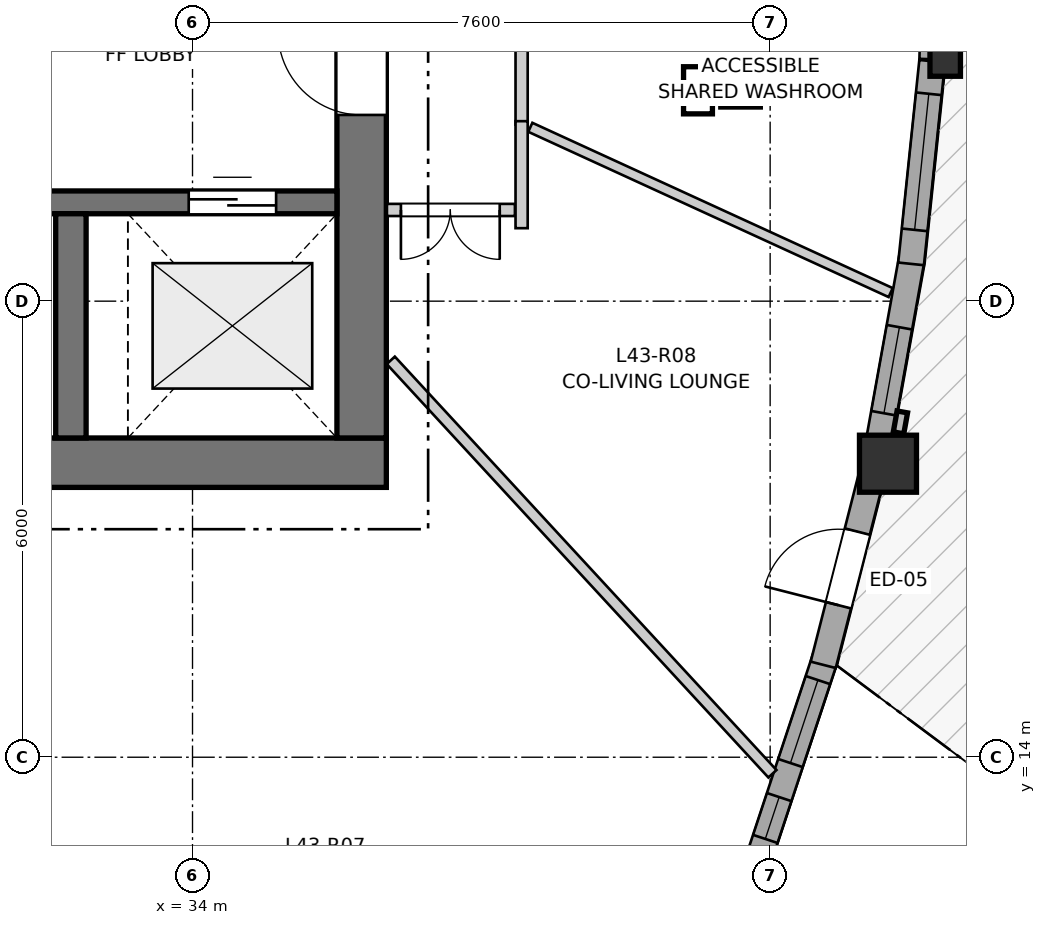
"""IFC4 building model, lengths in metres.
Left out: names, types, materials, properties, quantities, classifications, styles, units other than length and angle.
Written with IfcOpenShell. Run it as: python <this file> out.ifc"""

import sys

from ifc_helpers import new_model, si_unit, direction, frame, frame_2d, origin, origin_2d, place, context, subcontext, project, spatial, rectangle, i_section, extrude, source, transform, mapped, element, fill, save


model = new_model("IFC4")
c1 = context("Model", 3, precision=1e-05, world=origin(), true_north=direction((0.0, 1.0)))
c2 = subcontext(c1, "Body", "Model", "MODEL_VIEW")
j1 = project(units=[si_unit("LENGTHUNIT", "METRE"), si_unit("PLANEANGLEUNIT", "RADIAN")], contexts=[c1])
p1 = place(None, origin())
s1 = spatial("IfcSite", under=j1, at=p1, CompositionType="ELEMENT")
p2 = place(p1, origin())
s2 = spatial("IfcBuilding", under=s1, at=p2, CompositionType="ELEMENT")
p3 = place(p2, frame((0.0, 0.0, 145.8)))
s3 = spatial("IfcBuildingStorey", under=s2, at=p3, CompositionType="ELEMENT", Elevation=145.8)
p4 = place(p3, frame((24.15, 17.875, 0.0), z_axis=(0.0, 0.0, 1.0), x_axis=(1.0, 0.0, 0.0)))
e1 = element("IfcWall", 1, at=p4, inside=s3, PredefinedType="SHEAR", context=c2, shape_type="SweptSolid", body=[
    extrude(rectangle(XDim=12.4, YDim=0.65, at=frame_2d((6.2, 0.0))), origin(), (0.0, 0.0, 1.0), 2.95),
])
p5 = place(p3, frame((36.225, 18.2, 0.0), z_axis=(0.0, 0.0, 1.0), x_axis=(0.0, 1.0, 0.0)))
e2 = element("IfcWall", 2, at=p5, inside=s3, PredefinedType="SHEAR", context=c2, shape_type="SweptSolid", body=[
    extrude(rectangle(XDim=15.6, YDim=0.65, at=frame_2d((7.8, 0.0))), origin(), (0.0, 0.0, 1.0), 2.95),
])
p6 = place(p5, frame((4.25, 0.0, 0.0)))
e3 = element("IfcOpeningElement", 3, at=p6, cuts=e2, PredefinedType="OPENING", context=c2, shape_type="SweptSolid", body=[
    extrude(rectangle(XDim=1.1, YDim=2.15, at=frame_2d((0.55, 1.075))), frame((0.0, 0.335, 0.0), z_axis=(0.0, -1.0, 0.0), x_axis=(1.0, 0.0, 0.0)), (0.0, 0.0, 1.0), 0.67),
])
p7 = place(p5, frame((10.25, 0.0, 0.0)))
e4 = element("IfcOpeningElement", 4, at=p7, cuts=e2, PredefinedType="OPENING", context=c2, shape_type="SweptSolid", body=[
    extrude(rectangle(XDim=1.1, YDim=2.15, at=frame_2d((0.55, 1.075))), frame((0.0, 0.335, 0.0), z_axis=(0.0, -1.0, 0.0), x_axis=(1.0, 0.0, 0.0)), (0.0, 0.0, 1.0), 0.67),
])
p8 = place(p3, frame((24.8, 21.3, 0.0), z_axis=(0.0, 0.0, 1.0), x_axis=(1.0, 0.0, 0.0)))
e5 = element("IfcWall", 5, at=p8, inside=s3, PredefinedType="SHEAR", context=c2, shape_type="SweptSolid", body=[
    extrude(rectangle(XDim=11.1, YDim=0.3, at=frame_2d((5.55, 0.0))), origin(), (0.0, 0.0, 1.0), 2.95),
])
p9 = place(p8, frame((6.22, 0.0, 0.0)))
e6 = element("IfcOpeningElement", 6, at=p9, cuts=e5, PredefinedType="OPENING", context=c2, shape_type="SweptSolid", body=[
    extrude(rectangle(XDim=0.98, YDim=2.15, at=frame_2d((0.49, 1.075))), frame((0.0, 0.16, 0.0), z_axis=(0.0, -1.0, 0.0), x_axis=(1.0, 0.0, 0.0)), (0.0, 0.0, 1.0), 0.32),
])
p10 = place(p8, frame((9.15, 0.0, 0.0)))
e7 = element("IfcOpeningElement", 7, at=p10, cuts=e5, PredefinedType="OPENING", context=c2, shape_type="SweptSolid", body=[
    extrude(rectangle(XDim=1.15, YDim=2.15, at=frame_2d((0.575, 1.075))), frame((0.0, 0.16, 0.0), z_axis=(0.0, -1.0, 0.0), x_axis=(1.0, 0.0, 0.0)), (0.0, 0.0, 1.0), 0.32),
])
p11 = place(p3, frame((32.4, 18.2, 0.0), z_axis=(0.0, 0.0, 1.0), x_axis=(0.0, 1.0, 0.0)))
e8 = element("IfcWall", 8, at=p11, inside=s3, PredefinedType="SHEAR", context=c2, shape_type="SweptSolid", body=[
    extrude(rectangle(XDim=2.95, YDim=0.4, at=frame_2d((1.475, 0.0))), origin(), (0.0, 0.0, 1.0), 2.95),
])
m1 = source(origin(), c2, "Body", "SweptSolid", [
    extrude(rectangle(XDim=0.75, YDim=0.75, at=origin_2d()), origin(), (0.0, 0.0, 1.0), 2.95),
])
p12 = place(p3, frame((43.15, 17.862, 0.0), z_axis=(0.0, 0.0, 1.0), x_axis=(1.0, 0.0, 0.0)))
e9 = element("IfcColumn", 9, at=p12, inside=s3, PredefinedType="COLUMN", context=c2, shape_type="MappedRepresentation", body=[
    mapped(m1, transform((0.0, 0.0, 0.0), x_axis=(1.0, 0.0, 0.0), y_axis=(0.0, 1.0, 0.0), z_axis=(0.0, 0.0, 1.0), scale=1.0)),
])
m2 = source(origin(), c2, "Body", "SweptSolid", [
    extrude(i_section(OverallWidth=0.401, OverallDepth=0.399, WebThickness=0.023, FlangeThickness=0.036, FilletRadius=0.015, at=origin_2d()), origin(), (0.0, 0.0, 1.0), 2.95),
])
p13 = place(p3, frame((43.903, 23.158, 0.0), z_axis=(0.0, 0.0, 1.0), x_axis=(1.0, 0.0, 0.0)))
e10 = element("IfcColumn", 10, at=p13, inside=s3, PredefinedType="PILASTER", context=c2, shape_type="MappedRepresentation", body=[
    mapped(m2, transform((0.0, 0.0, 0.0), x_axis=(1.0, 0.0, 0.0), y_axis=(0.0, 1.0, 0.0), z_axis=(0.0, 0.0, 1.0), scale=1.0)),
])
p14 = place(p3, frame((41.438, 12.629, 0.0), z_axis=(0.0, 0.0, 1.0), x_axis=(0.314534815528, 0.949245937479, 0.0)))
e11 = element("IfcWall", 11, at=p14, inside=s3, PredefinedType="SOLIDWALL", context=c2, shape_type="SweptSolid", body=[
    extrude(rectangle(XDim=2.813, YDim=0.34, at=frame_2d((1.406, 0.0))), origin(), (0.0, 0.0, 1.0), 2.53),
])
p15 = place(p14, frame((0.312, 0.0, 0.82)))
e12 = element("IfcOpeningElement", 12, at=p15, cuts=e11, PredefinedType="OPENING", context=c2, shape_type="SweptSolid", body=[
    extrude(rectangle(XDim=0.58, YDim=1.35, at=frame_2d((0.29, 0.675))), frame((0.0, 0.18, 0.0), z_axis=(0.0, -1.0, 0.0), x_axis=(1.0, 0.0, 0.0)), (0.0, 0.0, 1.0), 0.36),
])
p16 = place(p14, frame((1.363, 0.0, 0.82)))
e13 = element("IfcOpeningElement", 13, at=p16, cuts=e11, PredefinedType="OPENING", context=c2, shape_type="SweptSolid", body=[
    extrude(rectangle(XDim=1.15, YDim=1.2, at=frame_2d((0.575, 0.6))), frame((0.0, 0.18, 0.0), z_axis=(0.0, -1.0, 0.0), x_axis=(1.0, 0.0, 0.0)), (0.0, 0.0, 1.0), 0.36),
])
p17 = place(p3, frame((42.298, 15.215, 0.0), z_axis=(0.0, 0.0, 1.0), x_axis=(0.24779460158, 0.968812590457, 0.0)))
e14 = element("IfcWall", 14, at=p17, inside=s3, PredefinedType="SOLIDWALL", context=c2, shape_type="SweptSolid", body=[
    extrude(rectangle(XDim=2.62, YDim=0.34, at=frame_2d((1.31, 0.0))), origin(), (0.0, 0.0, 1.0), 2.53),
])
p18 = place(p17, frame((0.81, 0.0, 0.0)))
e15 = element("IfcOpeningElement", 15, at=p18, cuts=e14, PredefinedType="OPENING", context=c2, shape_type="SweptSolid", body=[
    extrude(rectangle(XDim=1.0, YDim=2.1, at=frame_2d((0.5, 1.05))), frame((0.0, 0.18, 0.0), z_axis=(0.0, -1.0, 0.0), x_axis=(1.0, 0.0, 0.0)), (0.0, 0.0, 1.0), 0.36),
])
p19 = place(p3, frame((43.01, 18.044, 0.0), z_axis=(0.0, 0.0, 1.0), x_axis=(0.177116262048, 0.984189935794, 0.0)))
e16 = element("IfcWall", 16, at=p19, inside=s3, PredefinedType="SOLIDWALL", context=c2, shape_type="SweptSolid", body=[
    extrude(rectangle(XDim=2.575, YDim=0.34, at=frame_2d((1.288, 0.0))), origin(), (0.0, 0.0, 1.0), 2.53),
])
p20 = place(p19, frame((0.489, 0.0, 0.82)))
e17 = element("IfcOpeningElement", 17, at=p20, cuts=e16, PredefinedType="OPENING", context=c2, shape_type="SweptSolid", body=[
    extrude(rectangle(XDim=1.15, YDim=1.2, at=frame_2d((0.575, 0.6))), frame((0.0, 0.18, 0.0), z_axis=(0.0, -1.0, 0.0), x_axis=(1.0, 0.0, 0.0)), (0.0, 0.0, 1.0), 0.36),
])
p21 = place(p3, frame((43.454, 20.49, 0.0), z_axis=(0.0, 0.0, 1.0), x_axis=(0.103669919384, 0.994611757328, 0.0)))
e18 = element("IfcWall", 18, at=p21, inside=s3, PredefinedType="SOLIDWALL", context=c2, shape_type="SweptSolid", body=[
    extrude(rectangle(XDim=2.68, YDim=0.34, at=frame_2d((1.34, 0.0))), origin(), (0.0, 0.0, 1.0), 2.53),
])
p22 = place(p21, frame((0.45, 0.0, 0.82)))
e19 = element("IfcOpeningElement", 19, at=p22, cuts=e18, PredefinedType="OPENING", context=c2, shape_type="SweptSolid", body=[
    extrude(rectangle(XDim=1.8, YDim=1.45, at=frame_2d((0.9, 0.725))), frame((0.0, 0.18, 0.0), z_axis=(0.0, -1.0, 0.0), x_axis=(1.0, 0.0, 0.0)), (0.0, 0.0, 1.0), 0.36),
])
p23 = place(p3, frame((43.734, 23.183, 0.0), z_axis=(0.0, 0.0, 1.0), x_axis=(0.028311286797, 0.999599155182, 0.0)))
e20 = element("IfcWall", 20, at=p23, inside=s3, PredefinedType="SOLIDWALL", context=c2, shape_type="SweptSolid", body=[
    extrude(rectangle(XDim=2.665, YDim=0.34, at=frame_2d((1.332, 0.0))), origin(), (0.0, 0.0, 1.0), 2.53),
])
p24 = place(p23, frame((0.323, 0.0, 0.82)))
e21 = element("IfcOpeningElement", 21, at=p24, cuts=e20, PredefinedType="OPENING", context=c2, shape_type="SweptSolid", body=[
    extrude(rectangle(XDim=1.05, YDim=1.45, at=frame_2d((0.525, 0.725))), frame((0.0, 0.18, 0.0), z_axis=(0.0, -1.0, 0.0), x_axis=(1.0, 0.0, 0.0)), (0.0, 0.0, 1.0), 0.36),
])
p25 = place(p3, frame((38.33, 25.213, 0.0), z_axis=(0.0, 0.0, 1.0), x_axis=(0.0, -1.0, 0.0)))
e22 = element("IfcWall", 22, at=p25, inside=s3, PredefinedType="PARTITIONING", context=c2, shape_type="SweptSolid", body=[
    extrude(rectangle(XDim=2.89, YDim=0.16, at=frame_2d((1.445, 0.0))), origin(), (0.0, 0.0, 1.0), 2.95),
])
p26 = place(p25, frame((0.946, 0.0, 0.0)))
e23 = element("IfcOpeningElement", 23, at=p26, cuts=e22, PredefinedType="OPENING", context=c2, shape_type="SweptSolid", body=[
    extrude(rectangle(XDim=0.95, YDim=2.1, at=frame_2d((0.475, 1.05))), frame((0.0, 0.09, 0.0), z_axis=(0.0, -1.0, 0.0), x_axis=(1.0, 0.0, 0.0)), (0.0, 0.0, 1.0), 0.18),
])
p27 = place(p3, frame((38.242, 21.2, 0.0), z_axis=(0.0, 0.0, 1.0), x_axis=(-1.0, 0.0, 0.0)))
e24 = element("IfcWall", 24, at=p27, inside=s3, PredefinedType="PARTITIONING", context=c2, shape_type="SweptSolid", body=[
    extrude(rectangle(XDim=1.684, YDim=0.16, at=frame_2d((0.842, 0.0))), origin(), (0.0, 0.0, 1.0), 2.95),
])
p28 = place(p27, frame((0.2, 0.0, 0.0)))
e25 = element("IfcOpeningElement", 25, at=p28, cuts=e24, PredefinedType="OPENING", context=c2, shape_type="SweptSolid", body=[
    extrude(rectangle(XDim=1.3, YDim=2.1, at=frame_2d((0.65, 1.05))), frame((0.0, 0.09, 0.0), z_axis=(0.0, -1.0, 0.0), x_axis=(1.0, 0.0, 0.0)), (0.0, 0.0, 1.0), 0.18),
])
p29 = place(p3, frame((36.609, 19.221, 0.0), z_axis=(0.0, 0.0, 1.0), x_axis=(0.67832941292, -0.734757924467, 0.0)))
e26 = element("IfcWall", 26, at=p29, inside=s3, PredefinedType="PARTITIONING", context=c2, shape_type="SweptSolid", body=[
    extrude(rectangle(XDim=7.403, YDim=0.145, at=frame_2d((3.701, 0.0))), origin(), (0.0, 0.0, 1.0), 2.95),
])
p30 = place(p3, frame((38.444, 22.288, 0.0), z_axis=(0.0, 0.0, 1.0), x_axis=(0.908945866603, -0.416914153736, 0.0)))
e27 = element("IfcWall", 27, at=p30, inside=s3, PredefinedType="PARTITIONING", context=c2, shape_type="SweptSolid", body=[
    extrude(rectangle(XDim=5.217, YDim=0.13, at=frame_2d((2.608, 0.0))), origin(), (0.0, 0.0, 1.0), 2.95),
])
p31 = place(p3, frame((38.33, 20.96, 0.0), z_axis=(0.0, 0.0, 1.0), x_axis=(0.0, 1.0, 0.0)))
e28 = element("IfcWall", 28, at=p31, inside=s3, PredefinedType="PARTITIONING", context=c2, shape_type="SweptSolid", body=[
    extrude(rectangle(XDim=1.408, YDim=0.16, at=frame_2d((0.704, 0.0))), origin(), (0.0, 0.0, 1.0), 2.95),
])
m3 = source(origin(), c2, "Body", "SweptSolid", [
    extrude(rectangle(XDim=0.58, YDim=1.35, at=frame_2d((0.29, 0.675))), frame((0.0, 0.03, 0.0), z_axis=(0.0, -1.0, 0.0), x_axis=(1.0, 0.0, 0.0)), (0.0, 0.0, 1.0), 0.06),
])
p32 = place(p15, origin())
e29 = element("IfcWindow", 29, at=p32, inside=s3, PartitioningType="SINGLE_PANEL", PredefinedType="WINDOW", context=c2, shape_type="MappedRepresentation", body=[
    mapped(m3, transform((0.0, 0.0, 0.0), x_axis=(1.0, 0.0, 0.0), y_axis=(0.0, 1.0, 0.0), z_axis=(0.0, 0.0, 1.0), scale=1.0)),
])
fill(e12, e29)
m4 = source(origin(), c2, "Body", "SweptSolid", [
    extrude(rectangle(XDim=1.15, YDim=1.2, at=frame_2d((0.575, 0.6))), frame((0.0, 0.03, 0.0), z_axis=(0.0, -1.0, 0.0), x_axis=(1.0, 0.0, 0.0)), (0.0, 0.0, 1.0), 0.06),
])
p33 = place(p16, origin())
e30 = element("IfcWindow", 30, at=p33, inside=s3, PartitioningType="SINGLE_PANEL", PredefinedType="WINDOW", context=c2, shape_type="MappedRepresentation", body=[
    mapped(m4, transform((0.0, 0.0, 0.0), x_axis=(1.0, 0.0, 0.0), y_axis=(0.0, 1.0, 0.0), z_axis=(0.0, 0.0, 1.0), scale=1.0)),
])
fill(e13, e30)
p34 = place(p20, origin())
e31 = element("IfcWindow", 31, at=p34, inside=s3, PartitioningType="SINGLE_PANEL", PredefinedType="WINDOW", context=c2, shape_type="MappedRepresentation", body=[
    mapped(m4, transform((0.0, 0.0, 0.0), x_axis=(1.0, 0.0, 0.0), y_axis=(0.0, 1.0, 0.0), z_axis=(0.0, 0.0, 1.0), scale=1.0)),
])
fill(e17, e31)
m5 = source(origin(), c2, "Body", "SweptSolid", [
    extrude(rectangle(XDim=1.8, YDim=1.45, at=frame_2d((0.9, 0.725))), frame((0.0, 0.03, 0.0), z_axis=(0.0, -1.0, 0.0), x_axis=(1.0, 0.0, 0.0)), (0.0, 0.0, 1.0), 0.06),
])
p35 = place(p22, origin())
e32 = element("IfcWindow", 32, at=p35, inside=s3, PartitioningType="SINGLE_PANEL", PredefinedType="WINDOW", context=c2, shape_type="MappedRepresentation", body=[
    mapped(m5, transform((0.0, 0.0, 0.0), x_axis=(1.0, 0.0, 0.0), y_axis=(0.0, 1.0, 0.0), z_axis=(0.0, 0.0, 1.0), scale=1.0)),
])
fill(e19, e32)
m6 = source(origin(), c2, "Body", "SweptSolid", [
    extrude(rectangle(XDim=1.0, YDim=2.1, at=frame_2d((0.5, 1.05))), frame((0.0, 0.025, 0.0), z_axis=(0.0, -1.0, 0.0), x_axis=(1.0, 0.0, 0.0)), (0.0, 0.0, 1.0), 0.05),
])
p36 = place(p18, origin())
e33 = element("IfcDoor", 33, at=p36, inside=s3, OperationType="SINGLE_SWING_LEFT", PredefinedType="DOOR", context=c2, shape_type="MappedRepresentation", body=[
    mapped(m6, transform((0.0, 0.0, 0.0), x_axis=(1.0, 0.0, 0.0), y_axis=(0.0, 1.0, 0.0), z_axis=(0.0, 0.0, 1.0), scale=1.0)),
])
fill(e15, e33)
m7 = source(origin(), c2, "Body", "SweptSolid", [
    extrude(rectangle(XDim=1.15, YDim=2.15, at=frame_2d((0.575, 1.075))), frame((0.0, 0.025, 0.0), z_axis=(0.0, -1.0, 0.0), x_axis=(1.0, 0.0, 0.0)), (0.0, 0.0, 1.0), 0.05),
])
p37 = place(p10, origin())
e34 = element("IfcDoor", 34, at=p37, inside=s3, OperationType="DOUBLE_DOOR_SLIDING", PredefinedType="DOOR", context=c2, shape_type="MappedRepresentation", body=[
    mapped(m7, transform((0.0, 0.0, 0.0), x_axis=(1.0, 0.0, 0.0), y_axis=(0.0, 1.0, 0.0), z_axis=(0.0, 0.0, 1.0), scale=1.0)),
])
fill(e7, e34)
m8 = source(origin(), c2, "Body", "SweptSolid", [
    extrude(rectangle(XDim=1.1, YDim=2.15, at=frame_2d((0.55, 1.075))), frame((0.0, 0.025, 0.0), z_axis=(0.0, -1.0, 0.0), x_axis=(1.0, 0.0, 0.0)), (0.0, 0.0, 1.0), 0.05),
])
p38 = place(p6, origin())
e35 = element("IfcDoor", 35, at=p38, inside=s3, OperationType="SINGLE_SWING_RIGHT", PredefinedType="DOOR", context=c2, shape_type="MappedRepresentation", body=[
    mapped(m8, transform((0.0, 0.0, 0.0), x_axis=(1.0, 0.0, 0.0), y_axis=(0.0, 1.0, 0.0), z_axis=(0.0, 0.0, 1.0), scale=1.0)),
])
fill(e3, e35)
m9 = source(origin(), c2, "Body", "SweptSolid", [
    extrude(rectangle(XDim=1.3, YDim=2.1, at=frame_2d((0.65, 1.05))), frame((0.0, 0.025, 0.0), z_axis=(0.0, -1.0, 0.0), x_axis=(1.0, 0.0, 0.0)), (0.0, 0.0, 1.0), 0.05),
])
p39 = place(p28, origin())
e36 = element("IfcDoor", 36, at=p39, inside=s3, OperationType="DOUBLE_DOOR_SINGLE_SWING", PredefinedType="DOOR", context=c2, shape_type="MappedRepresentation", body=[
    mapped(m9, transform((0.0, 0.0, 0.0), x_axis=(1.0, 0.0, 0.0), y_axis=(0.0, 1.0, 0.0), z_axis=(0.0, 0.0, 1.0), scale=1.0)),
])
fill(e25, e36)
save(model, sys.argv[1])
